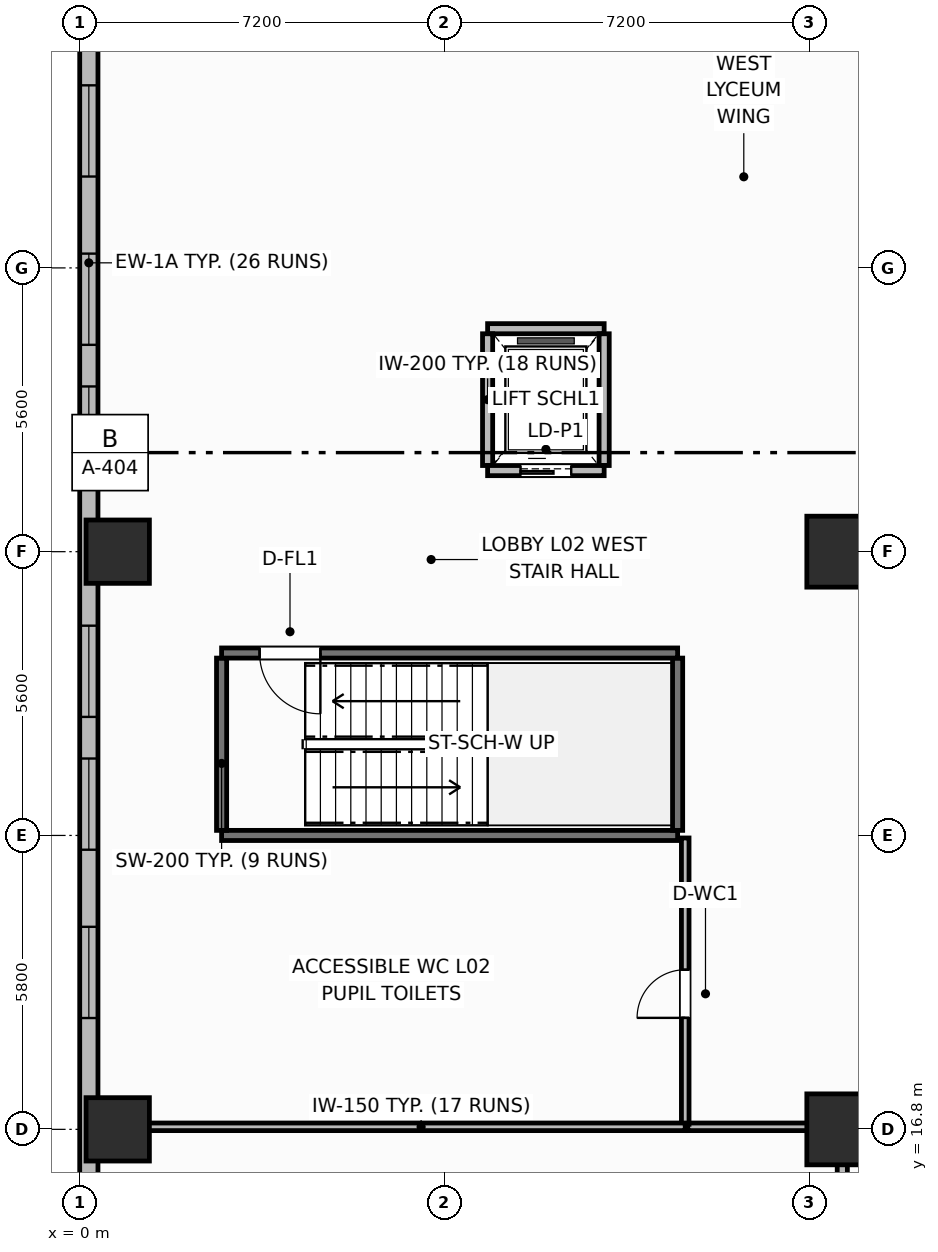
"""IFC4 building model, lengths in metres.
Left out: names, types, materials, properties, quantities, classifications, styles, units other than length and angle.
Written with IfcOpenShell. Run it as: python <this file> out.ifc"""

import sys

from ifc_helpers import new_model, si_unit, direction, frame, frame_2d, origin, origin_2d, place, context, subcontext, project, spatial, rectangle, extrude, element, fill, save


model = new_model("IFC4")
c1 = context("Model", 3, precision=1e-05, world=origin(), true_north=direction((0.0, 1.0)))
c2 = subcontext(c1, "Body", "Model", "MODEL_VIEW")
j1 = project(units=[si_unit("LENGTHUNIT", "METRE"), si_unit("PLANEANGLEUNIT", "RADIAN")], contexts=[c1])
p1 = place(None, origin())
s1 = spatial("IfcSite", under=j1, at=p1, CompositionType="ELEMENT")
p2 = place(p1, origin())
s2 = spatial("IfcBuilding", under=s1, at=p2, CompositionType="ELEMENT")
p3 = place(p2, frame((0.0, 0.0, 11.1)))
s3 = spatial("IfcBuildingStorey", under=s2, at=p3, CompositionType="ELEMENT", Elevation=11.1)
for number, where, z_axis, x_axis in (
    (1, (0.75, 16.8, 0.0), (0.0, 0.0, 1.0), (1.0, 0.0, 0.0)),
    (2, (0.75, 28.2, 0.0), (0.0, 0.0, 1.0), (1.0, 0.0, 0.0)),
):
    element("IfcColumn", number, at=place(p3, frame(where, z_axis=z_axis, x_axis=x_axis)), inside=s3, PredefinedType="COLUMN", context=c2, shape_type="SweptSolid", body=[
        extrude(rectangle(XDim=1.25, YDim=1.25, at=origin_2d()), origin(), (0.0, 0.0, 1.0), 4.5),
    ])
for number, where, z_axis, x_axis in (
    (3, (15.05, 16.8, 0.0), (0.0, 0.0, 1.0), (1.0, 0.0, 0.0)),
    (4, (15.05, 28.2, 0.0), (0.0, 0.0, 1.0), (1.0, 0.0, 0.0)),
):
    element("IfcColumn", number, at=place(p3, frame(where, z_axis=z_axis, x_axis=x_axis)), inside=s3, PredefinedType="COLUMN", context=c2, shape_type="SweptSolid", body=[
        extrude(rectangle(XDim=1.4, YDim=1.4, at=origin_2d()), origin(), (0.0, 0.0, 1.0), 4.5),
    ])
p4 = place(p3, frame((0.18, 55.42, 0.0), z_axis=(0.0, 0.0, 1.0), x_axis=(0.0, -1.0, 0.0)))
e5 = element("IfcWall", 5, at=p4, inside=s3, PredefinedType="SOLIDWALL", context=c2, shape_type="SweptSolid", body=[
    extrude(rectangle(XDim=54.44, YDim=0.36, at=frame_2d((27.22, 0.0))), origin(), (0.0, 0.0, 1.0), 3.48),
])
p5 = place(p4, frame((1.411, 0.0, 0.9)))
e6 = element("IfcOpeningElement", 6, at=p5, cuts=e5, PredefinedType="OPENING", context=c2, shape_type="SweptSolid", body=[
    extrude(rectangle(XDim=1.8, YDim=2.1, at=frame_2d((0.9, 1.05))), frame((0.0, 0.19, 0.0), z_axis=(0.0, -1.0, 0.0), x_axis=(1.0, 0.0, 0.0)), (0.0, 0.0, 1.0), 0.38),
])
p6 = place(p4, frame((4.732, 0.0, 0.9)))
e7 = element("IfcOpeningElement", 7, at=p6, cuts=e5, PredefinedType="OPENING", context=c2, shape_type="SweptSolid", body=[
    extrude(rectangle(XDim=1.8, YDim=2.1, at=frame_2d((0.9, 1.05))), frame((0.0, 0.19, 0.0), z_axis=(0.0, -1.0, 0.0), x_axis=(1.0, 0.0, 0.0)), (0.0, 0.0, 1.0), 0.38),
])
p7 = place(p4, frame((11.375, 0.0, 0.9)))
e8 = element("IfcOpeningElement", 8, at=p7, cuts=e5, PredefinedType="OPENING", context=c2, shape_type="SweptSolid", body=[
    extrude(rectangle(XDim=1.8, YDim=2.1, at=frame_2d((0.9, 1.05))), frame((0.0, 0.19, 0.0), z_axis=(0.0, -1.0, 0.0), x_axis=(1.0, 0.0, 0.0)), (0.0, 0.0, 1.0), 0.38),
])
p8 = place(p4, frame((18.017, 0.0, 0.9)))
e9 = element("IfcOpeningElement", 9, at=p8, cuts=e5, PredefinedType="OPENING", context=c2, shape_type="SweptSolid", body=[
    extrude(rectangle(XDim=1.8, YDim=2.1, at=frame_2d((0.9, 1.05))), frame((0.0, 0.19, 0.0), z_axis=(0.0, -1.0, 0.0), x_axis=(1.0, 0.0, 0.0)), (0.0, 0.0, 1.0), 0.38),
])
p9 = place(p4, frame((21.338, 0.0, 0.9)))
e10 = element("IfcOpeningElement", 10, at=p9, cuts=e5, PredefinedType="OPENING", context=c2, shape_type="SweptSolid", body=[
    extrude(rectangle(XDim=1.8, YDim=2.1, at=frame_2d((0.9, 1.05))), frame((0.0, 0.19, 0.0), z_axis=(0.0, -1.0, 0.0), x_axis=(1.0, 0.0, 0.0)), (0.0, 0.0, 1.0), 0.38),
])
p10 = place(p4, frame((23.959, 0.0, 0.9)))
e11 = element("IfcOpeningElement", 11, at=p10, cuts=e5, PredefinedType="OPENING", context=c2, shape_type="SweptSolid", body=[
    extrude(rectangle(XDim=1.8, YDim=2.1, at=frame_2d((0.9, 1.05))), frame((0.0, 0.19, 0.0), z_axis=(0.0, -1.0, 0.0), x_axis=(1.0, 0.0, 0.0)), (0.0, 0.0, 1.0), 0.38),
])
p11 = place(p4, frame((28.681, 0.0, 0.9)))
e12 = element("IfcOpeningElement", 12, at=p11, cuts=e5, PredefinedType="OPENING", context=c2, shape_type="SweptSolid", body=[
    extrude(rectangle(XDim=1.8, YDim=2.1, at=frame_2d((0.9, 1.05))), frame((0.0, 0.19, 0.0), z_axis=(0.0, -1.0, 0.0), x_axis=(1.0, 0.0, 0.0)), (0.0, 0.0, 1.0), 0.38),
])
p12 = place(p4, frame((31.302, 0.0, 0.9)))
e13 = element("IfcOpeningElement", 13, at=p12, cuts=e5, PredefinedType="OPENING", context=c2, shape_type="SweptSolid", body=[
    extrude(rectangle(XDim=1.8, YDim=2.1, at=frame_2d((0.9, 1.05))), frame((0.0, 0.19, 0.0), z_axis=(0.0, -1.0, 0.0), x_axis=(1.0, 0.0, 0.0)), (0.0, 0.0, 1.0), 0.38),
])
p13 = place(p4, frame((34.623, 0.0, 0.9)))
e14 = element("IfcOpeningElement", 14, at=p13, cuts=e5, PredefinedType="OPENING", context=c2, shape_type="SweptSolid", body=[
    extrude(rectangle(XDim=1.8, YDim=2.1, at=frame_2d((0.9, 1.05))), frame((0.0, 0.19, 0.0), z_axis=(0.0, -1.0, 0.0), x_axis=(1.0, 0.0, 0.0)), (0.0, 0.0, 1.0), 0.38),
])
p14 = place(p4, frame((41.266, 0.0, 0.9)))
e15 = element("IfcOpeningElement", 15, at=p14, cuts=e5, PredefinedType="OPENING", context=c2, shape_type="SweptSolid", body=[
    extrude(rectangle(XDim=1.8, YDim=2.1, at=frame_2d((0.9, 1.05))), frame((0.0, 0.19, 0.0), z_axis=(0.0, -1.0, 0.0), x_axis=(1.0, 0.0, 0.0)), (0.0, 0.0, 1.0), 0.38),
])
p15 = place(p4, frame((47.908, 0.0, 0.9)))
e16 = element("IfcOpeningElement", 16, at=p15, cuts=e5, PredefinedType="OPENING", context=c2, shape_type="SweptSolid", body=[
    extrude(rectangle(XDim=1.8, YDim=2.1, at=frame_2d((0.9, 1.05))), frame((0.0, 0.19, 0.0), z_axis=(0.0, -1.0, 0.0), x_axis=(1.0, 0.0, 0.0)), (0.0, 0.0, 1.0), 0.38),
])
p16 = place(p4, frame((51.229, 0.0, 0.9)))
e17 = element("IfcOpeningElement", 17, at=p16, cuts=e5, PredefinedType="OPENING", context=c2, shape_type="SweptSolid", body=[
    extrude(rectangle(XDim=1.8, YDim=2.1, at=frame_2d((0.9, 1.05))), frame((0.0, 0.19, 0.0), z_axis=(0.0, -1.0, 0.0), x_axis=(1.0, 0.0, 0.0)), (0.0, 0.0, 1.0), 0.38),
])
p17 = place(p3, frame((2.8, 22.6, 0.0), z_axis=(0.0, 0.0, 1.0), x_axis=(1.0, 0.0, 0.0)))
e18 = element("IfcWall", 18, at=p17, inside=s3, PredefinedType="SHEAR", context=c2, shape_type="SweptSolid", body=[
    extrude(rectangle(XDim=9.0, YDim=0.2, at=frame_2d((4.5, 0.0))), origin(), (0.0, 0.0, 1.0), 4.5),
])
for number, where, z_axis, x_axis in (
    (19, (2.8, 22.7, 0.0), (0.0, 0.0, 1.0), (0.0, 1.0, 0.0)),
    (20, (11.8, 22.7, 0.0), (0.0, 0.0, 1.0), (0.0, 1.0, 0.0)),
):
    element("IfcWall", number, at=place(p3, frame(where, z_axis=z_axis, x_axis=x_axis)), inside=s3, PredefinedType="SHEAR", context=c2, shape_type="SweptSolid", body=[
        extrude(rectangle(XDim=3.4, YDim=0.2, at=frame_2d((1.7, 0.0))), origin(), (0.0, 0.0, 1.0), 4.5),
    ])
p18 = place(p3, frame((11.8, 26.2, 0.0), z_axis=(0.0, 0.0, 1.0), x_axis=(-1.0, 0.0, 0.0)))
e21 = element("IfcWall", 21, at=p18, inside=s3, PredefinedType="SHEAR", context=c2, shape_type="SweptSolid", body=[
    extrude(rectangle(XDim=9.0, YDim=0.2, at=frame_2d((4.5, 0.0))), origin(), (0.0, 0.0, 1.0), 4.5),
])
p19 = place(p18, frame((7.05, 0.0, 0.0)))
e22 = element("IfcOpeningElement", 22, at=p19, cuts=e21, PredefinedType="OPENING", context=c2, shape_type="SweptSolid", body=[
    extrude(rectangle(XDim=1.2, YDim=2.15, at=frame_2d((0.6, 1.075))), frame((0.0, 0.11, 0.0), z_axis=(0.0, -1.0, 0.0), x_axis=(1.0, 0.0, 0.0)), (0.0, 0.0, 1.0), 0.22),
])
p20 = place(p3, frame((8.05, 32.6, 0.0), z_axis=(0.0, 0.0, 1.0), x_axis=(1.0, 0.0, 0.0)))
e23 = element("IfcWall", 23, at=p20, inside=s3, PredefinedType="PARTITIONING", context=c2, shape_type="SweptSolid", body=[
    extrude(rectangle(XDim=2.3, YDim=0.2, at=frame_2d((1.15, 0.0))), origin(), (0.0, 0.0, 1.0), 3.42),
])
for number, where, z_axis, x_axis in (
    (24, (8.05, 29.9, 0.0), (0.0, 0.0, 1.0), (0.0, 1.0, 0.0)),
    (25, (10.35, 29.9, 0.0), (0.0, 0.0, 1.0), (0.0, 1.0, 0.0)),
):
    element("IfcWall", number, at=place(p3, frame(where, z_axis=z_axis, x_axis=x_axis)), inside=s3, PredefinedType="PARTITIONING", context=c2, shape_type="SweptSolid", body=[
        extrude(rectangle(XDim=2.6, YDim=0.2, at=frame_2d((1.3, 0.0))), origin(), (0.0, 0.0, 1.0), 3.42),
    ])
p21 = place(p3, frame((8.05, 29.8, 0.0), z_axis=(0.0, 0.0, 1.0), x_axis=(1.0, 0.0, 0.0)))
e26 = element("IfcWall", 26, at=p21, inside=s3, PredefinedType="PARTITIONING", context=c2, shape_type="SweptSolid", body=[
    extrude(rectangle(XDim=2.3, YDim=0.2, at=frame_2d((1.15, 0.0))), origin(), (0.0, 0.0, 1.0), 3.42),
])
p22 = place(p21, frame((0.65, 0.0, 0.0)))
e27 = element("IfcOpeningElement", 27, at=p22, cuts=e26, PredefinedType="OPENING", context=c2, shape_type="SweptSolid", body=[
    extrude(rectangle(XDim=1.0, YDim=2.15, at=frame_2d((0.5, 1.075))), frame((0.0, 0.11, 0.0), z_axis=(0.0, -1.0, 0.0), x_axis=(1.0, 0.0, 0.0)), (0.0, 0.0, 1.0), 0.22),
])
p23 = place(p3, frame((15.05, 0.4, 0.0), z_axis=(0.0, 0.0, 1.0), x_axis=(0.0, 1.0, 0.0)))
e28 = element("IfcWall", 28, at=p23, inside=s3, PredefinedType="PARTITIONING", context=c2, shape_type="SweptSolid", body=[
    extrude(rectangle(XDim=16.4, YDim=0.2, at=frame_2d((8.2, 0.0))), origin(), (0.0, 0.0, 1.0), 3.42),
])
p24 = place(p23, frame((5.5, 0.0, 0.0)))
e29 = element("IfcOpeningElement", 29, at=p24, cuts=e28, PredefinedType="OPENING", context=c2, shape_type="SweptSolid", body=[
    extrude(rectangle(XDim=1.0, YDim=2.15, at=frame_2d((0.5, 1.075))), frame((0.0, 0.11, 0.0), z_axis=(0.0, -1.0, 0.0), x_axis=(1.0, 0.0, 0.0)), (0.0, 0.0, 1.0), 0.22),
])
p25 = place(p3, frame((12.0, 16.85, 0.0), z_axis=(0.0, 0.0, 1.0), x_axis=(1.0, 0.0, 0.0)))
e30 = element("IfcWall", 30, at=p25, inside=s3, PredefinedType="PARTITIONING", context=c2, shape_type="SweptSolid", body=[
    extrude(rectangle(XDim=13.25, YDim=0.15, at=frame_2d((6.625, 0.0))), origin(), (0.0, 0.0, 1.0), 3.42),
])
p26 = place(p25, frame((7.5, 0.0, 0.0)))
e31 = element("IfcOpeningElement", 31, at=p26, cuts=e30, PredefinedType="OPENING", context=c2, shape_type="SweptSolid", body=[
    extrude(rectangle(XDim=1.0, YDim=2.15, at=frame_2d((0.5, 1.075))), frame((0.0, 0.085, 0.0), z_axis=(0.0, -1.0, 0.0), x_axis=(1.0, 0.0, 0.0)), (0.0, 0.0, 1.0), 0.17),
])
p27 = place(p3, frame((11.95, 16.9, 0.0), z_axis=(0.0, 0.0, 1.0), x_axis=(0.0, 1.0, 0.0)))
e32 = element("IfcWall", 32, at=p27, inside=s3, PredefinedType="PARTITIONING", context=c2, shape_type="SweptSolid", body=[
    extrude(rectangle(XDim=5.65, YDim=0.15, at=frame_2d((2.825, 0.0))), origin(), (0.0, 0.0, 1.0), 3.42),
])
p28 = place(p27, frame((2.1, 0.0, 0.0)))
e33 = element("IfcOpeningElement", 33, at=p28, cuts=e32, PredefinedType="OPENING", context=c2, shape_type="SweptSolid", body=[
    extrude(rectangle(XDim=0.95, YDim=2.1, at=frame_2d((0.475, 1.05))), frame((0.0, 0.085, 0.0), z_axis=(0.0, -1.0, 0.0), x_axis=(1.0, 0.0, 0.0)), (0.0, 0.0, 1.0), 0.17),
])
p29 = place(p3, frame((0.4, 16.85, 0.0), z_axis=(0.0, 0.0, 1.0), x_axis=(1.0, 0.0, 0.0)))
e34 = element("IfcWall", 34, at=p29, inside=s3, PredefinedType="PARTITIONING", context=c2, shape_type="SweptSolid", body=[
    extrude(rectangle(XDim=11.55, YDim=0.15, at=frame_2d((5.775, 0.0))), origin(), (0.0, 0.0, 1.0), 3.42),
])
p30 = place(p8, origin())
e35 = element("IfcWindow", 35, at=p30, inside=s3, PartitioningType="SINGLE_PANEL", PredefinedType="WINDOW", context=c2, shape_type="SweptSolid", body=[
    extrude(rectangle(XDim=1.8, YDim=2.1, at=frame_2d((0.9, 1.05))), frame((0.0, 0.03, 0.0), z_axis=(0.0, -1.0, 0.0), x_axis=(1.0, 0.0, 0.0)), (0.0, 0.0, 1.0), 0.06),
])
fill(e9, e35)
p31 = place(p9, origin())
e36 = element("IfcWindow", 36, at=p31, inside=s3, PartitioningType="SINGLE_PANEL", PredefinedType="WINDOW", context=c2, shape_type="SweptSolid", body=[
    extrude(rectangle(XDim=1.8, YDim=2.1, at=frame_2d((0.9, 1.05))), frame((0.0, 0.03, 0.0), z_axis=(0.0, -1.0, 0.0), x_axis=(1.0, 0.0, 0.0)), (0.0, 0.0, 1.0), 0.06),
])
fill(e10, e36)
p32 = place(p10, origin())
e37 = element("IfcWindow", 37, at=p32, inside=s3, PartitioningType="SINGLE_PANEL", PredefinedType="WINDOW", context=c2, shape_type="SweptSolid", body=[
    extrude(rectangle(XDim=1.8, YDim=2.1, at=frame_2d((0.9, 1.05))), frame((0.0, 0.03, 0.0), z_axis=(0.0, -1.0, 0.0), x_axis=(1.0, 0.0, 0.0)), (0.0, 0.0, 1.0), 0.06),
])
fill(e11, e37)
p33 = place(p11, origin())
e38 = element("IfcWindow", 38, at=p33, inside=s3, PartitioningType="SINGLE_PANEL", PredefinedType="WINDOW", context=c2, shape_type="SweptSolid", body=[
    extrude(rectangle(XDim=1.8, YDim=2.1, at=frame_2d((0.9, 1.05))), frame((0.0, 0.03, 0.0), z_axis=(0.0, -1.0, 0.0), x_axis=(1.0, 0.0, 0.0)), (0.0, 0.0, 1.0), 0.06),
])
fill(e12, e38)
p34 = place(p12, origin())
e39 = element("IfcWindow", 39, at=p34, inside=s3, PartitioningType="SINGLE_PANEL", PredefinedType="WINDOW", context=c2, shape_type="SweptSolid", body=[
    extrude(rectangle(XDim=1.8, YDim=2.1, at=frame_2d((0.9, 1.05))), frame((0.0, 0.03, 0.0), z_axis=(0.0, -1.0, 0.0), x_axis=(1.0, 0.0, 0.0)), (0.0, 0.0, 1.0), 0.06),
])
fill(e13, e39)
p35 = place(p13, origin())
e40 = element("IfcWindow", 40, at=p35, inside=s3, PartitioningType="SINGLE_PANEL", PredefinedType="WINDOW", context=c2, shape_type="SweptSolid", body=[
    extrude(rectangle(XDim=1.8, YDim=2.1, at=frame_2d((0.9, 1.05))), frame((0.0, 0.03, 0.0), z_axis=(0.0, -1.0, 0.0), x_axis=(1.0, 0.0, 0.0)), (0.0, 0.0, 1.0), 0.06),
])
fill(e14, e40)
p36 = place(p19, origin())
e41 = element("IfcDoor", 41, at=p36, inside=s3, OperationType="SINGLE_SWING_LEFT", PredefinedType="DOOR", context=c2, shape_type="SweptSolid", body=[
    extrude(rectangle(XDim=1.2, YDim=2.15, at=frame_2d((0.6, 1.075))), frame((0.0, 0.025, 0.0), z_axis=(0.0, -1.0, 0.0), x_axis=(1.0, 0.0, 0.0)), (0.0, 0.0, 1.0), 0.05),
])
fill(e22, e41)
p37 = place(p22, origin())
e42 = element("IfcDoor", 42, at=p37, inside=s3, OperationType="SLIDING_TO_LEFT", PredefinedType="DOOR", context=c2, shape_type="SweptSolid", body=[
    extrude(rectangle(XDim=1.0, YDim=2.15, at=frame_2d((0.5, 1.075))), frame((0.0, 0.025, 0.0), z_axis=(0.0, -1.0, 0.0), x_axis=(1.0, 0.0, 0.0)), (0.0, 0.0, 1.0), 0.05),
])
fill(e27, e42)
p38 = place(p28, origin())
e43 = element("IfcDoor", 43, at=p38, inside=s3, OperationType="SINGLE_SWING_LEFT", PredefinedType="DOOR", context=c2, shape_type="SweptSolid", body=[
    extrude(rectangle(XDim=0.95, YDim=2.1, at=frame_2d((0.475, 1.05))), frame((0.0, 0.025, 0.0), z_axis=(0.0, -1.0, 0.0), x_axis=(1.0, 0.0, 0.0)), (0.0, 0.0, 1.0), 0.05),
])
fill(e33, e43)
save(model, sys.argv[1])
